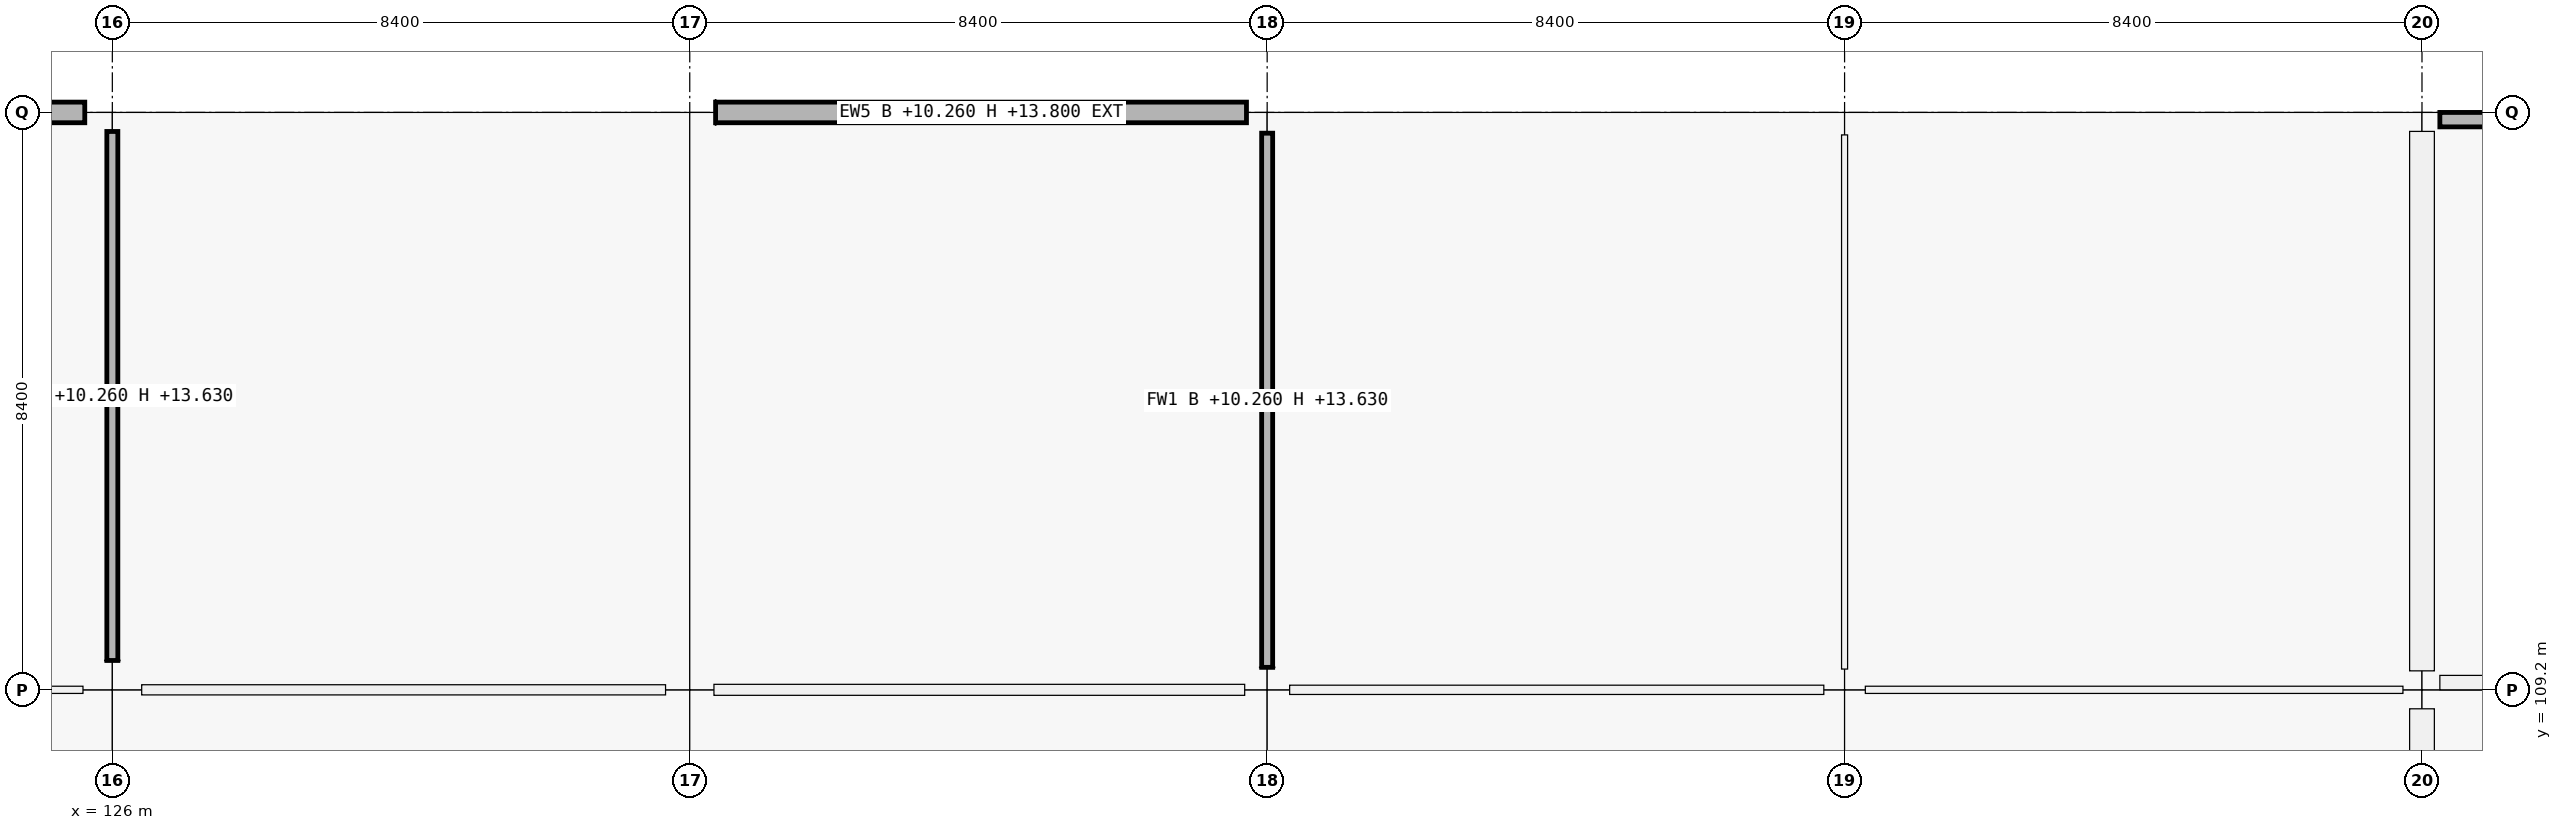
"""IFC4 building model, lengths in metres.
Left out: names, types, materials, properties, quantities, classifications, styles, units other than length and angle.
Written with IfcOpenShell. Run it as: python <this file> out.ifc"""

import sys

from ifc_helpers import new_model, si_unit, direction, frame, frame_2d, origin, origin_2d, place, context, subcontext, project, spatial, rectangle, extrude, element, fill, save


model = new_model("IFC4")
c1 = context("Model", 3, precision=1e-05, world=origin(), true_north=direction((0.0, 1.0)))
c2 = subcontext(c1, "Body", "Model", "MODEL_VIEW")
j1 = project(units=[si_unit("LENGTHUNIT", "METRE"), si_unit("PLANEANGLEUNIT", "RADIAN")], contexts=[c1])
p1 = place(None, origin())
s1 = spatial("IfcSite", under=j1, at=p1, CompositionType="ELEMENT")
p2 = place(p1, origin())
s2 = spatial("IfcBuilding", under=s1, at=p2, CompositionType="ELEMENT")
p3 = place(p2, frame((0.0, 0.0, 10.26)))
s3 = spatial("IfcBuildingStorey", under=s2, at=p3, CompositionType="ELEMENT", Elevation=10.26)
p4 = place(p3, frame((126.0, 109.2, 0.0), z_axis=(0.0, 0.0, 1.0), x_axis=(1.0, 0.0, 0.0)))
e1 = element("IfcColumn", 1, at=p4, inside=s3, PredefinedType="COLUMN", context=c2, shape_type="SweptSolid", body=[
    extrude(rectangle(XDim=0.85, YDim=0.85, at=origin_2d()), origin(), (0.0, 0.0, 1.0), 4.5),
])
p5 = place(p3, frame((126.0, 117.6, 0.0), z_axis=(0.0, 0.0, 1.0), x_axis=(1.0, 0.0, 0.0)))
e2 = element("IfcColumn", 2, at=p5, inside=s3, PredefinedType="COLUMN", context=c2, shape_type="SweptSolid", body=[
    extrude(rectangle(XDim=0.8, YDim=0.55, at=origin_2d()), origin(), (0.0, 0.0, 1.0), 4.5),
])
p6 = place(p3, frame((134.4, 109.2, 0.0), z_axis=(0.0, 0.0, 1.0), x_axis=(1.0, 0.0, 0.0)))
e3 = element("IfcColumn", 3, at=p6, inside=s3, PredefinedType="COLUMN", context=c2, shape_type="SweptSolid", body=[
    extrude(rectangle(XDim=0.7, YDim=0.7, at=origin_2d()), origin(), (0.0, 0.0, 1.0), 4.5),
])
p7 = place(p3, frame((134.4, 117.6, 0.0), z_axis=(0.0, 0.0, 1.0), x_axis=(1.0, 0.0, 0.0)))
e4 = element("IfcColumn", 4, at=p7, inside=s3, PredefinedType="COLUMN", context=c2, shape_type="SweptSolid", body=[
    extrude(rectangle(XDim=0.75, YDim=0.75, at=origin_2d()), origin(), (0.0, 0.0, 1.0), 4.5),
])
p8 = place(p3, frame((142.8, 109.2, 0.0), z_axis=(0.0, 0.0, 1.0), x_axis=(1.0, 0.0, 0.0)))
e5 = element("IfcColumn", 5, at=p8, inside=s3, PredefinedType="COLUMN", context=c2, shape_type="SweptSolid", body=[
    extrude(rectangle(XDim=0.65, YDim=0.65, at=origin_2d()), origin(), (0.0, 0.0, 1.0), 4.5),
])
for number, where, z_axis, x_axis in (
    (6, (142.8, 117.6, 0.0), (0.0, 0.0, 1.0), (1.0, 0.0, 0.0)),
    (7, (151.2, 109.2, 0.0), (0.0, 0.0, 1.0), (1.0, 0.0, 0.0)),
):
    element("IfcColumn", number, at=place(p3, frame(where, z_axis=z_axis, x_axis=x_axis)), inside=s3, PredefinedType="COLUMN", context=c2, shape_type="SweptSolid", body=[
        extrude(rectangle(XDim=0.6, YDim=0.6, at=origin_2d()), origin(), (0.0, 0.0, 1.0), 4.5),
    ])
p9 = place(p3, frame((151.2, 117.6, 0.0), z_axis=(0.0, 0.0, 1.0), x_axis=(1.0, 0.0, 0.0)))
e8 = element("IfcColumn", 8, at=p9, inside=s3, PredefinedType="COLUMN", context=c2, shape_type="SweptSolid", body=[
    extrude(rectangle(XDim=0.65, YDim=0.65, at=origin_2d()), origin(), (0.0, 0.0, 1.0), 4.5),
])
for number, where, z_axis, x_axis in (
    (9, (159.6, 109.2, 0.0), (0.0, 0.0, 1.0), (1.0, 0.0, 0.0)),
    (10, (159.6, 117.6, 0.0), (0.0, 0.0, 1.0), (1.0, 0.0, 0.0)),
):
    element("IfcColumn", number, at=place(p3, frame(where, z_axis=z_axis, x_axis=x_axis)), inside=s3, PredefinedType="COLUMN", context=c2, shape_type="SweptSolid", body=[
        extrude(rectangle(XDim=0.55, YDim=0.55, at=origin_2d()), origin(), (0.0, 0.0, 1.0), 4.25),
    ])
p10 = place(p3, frame((118.001, 117.6, 0.0), z_axis=(0.0, 0.0, 1.0), x_axis=(1.0, 0.0, 0.0)))
e11 = element("IfcWall", 11, at=p10, inside=s3, PredefinedType="SOLIDWALL", context=c2, shape_type="SweptSolid", body=[
    extrude(rectangle(XDim=7.598, YDim=0.3, at=frame_2d((3.799, 0.0))), origin(), (0.0, 0.0, 1.0), 3.54),
])
p11 = place(p10, frame((3.149, 0.0, 0.9)))
e12 = element("IfcOpeningElement", 12, at=p11, cuts=e11, PredefinedType="OPENING", context=c2, shape_type="SweptSolid", body=[
    extrude(rectangle(XDim=1.3, YDim=1.95, at=frame_2d((0.65, 0.975))), frame((0.0, 0.15, 0.0), z_axis=(0.0, -1.0, 0.0), x_axis=(1.0, 0.0, 0.0)), (0.0, 0.0, 1.0), 0.3),
])
p12 = place(p3, frame((134.776, 117.6, 0.0), z_axis=(0.0, 0.0, 1.0), x_axis=(1.0, 0.0, 0.0)))
e13 = element("IfcWall", 13, at=p12, inside=s3, PredefinedType="SOLIDWALL", context=c2, shape_type="SweptSolid", body=[
    extrude(rectangle(XDim=7.723, YDim=0.3, at=frame_2d((3.862, 0.0))), origin(), (0.0, 0.0, 1.0), 3.54),
])
p13 = place(p12, frame((3.087, 0.0, 0.9)))
e14 = element("IfcOpeningElement", 14, at=p13, cuts=e13, PredefinedType="OPENING", context=c2, shape_type="SweptSolid", body=[
    extrude(rectangle(XDim=1.55, YDim=1.6, at=frame_2d((0.775, 0.8))), frame((0.0, 0.15, 0.0), z_axis=(0.0, -1.0, 0.0), x_axis=(1.0, 0.0, 0.0)), (0.0, 0.0, 1.0), 0.3),
])
p14 = place(p3, frame((159.6, 108.924, 0.0), z_axis=(0.0, 0.0, 1.0), x_axis=(0.0, -1.0, 0.0)))
e15 = element("IfcWall", 15, at=p14, inside=s3, PredefinedType="SOLIDWALL", context=c2, shape_type="SweptSolid", body=[
    extrude(rectangle(XDim=7.848, YDim=0.36, at=frame_2d((3.924, 0.0))), origin(), (0.0, 0.0, 1.0), 3.54),
])
p15 = place(p14, frame((3.099, 0.0, 0.0)))
e16 = element("IfcOpeningElement", 16, at=p15, cuts=e15, PredefinedType="OPENING", context=c2, shape_type="SweptSolid", body=[
    extrude(rectangle(XDim=1.65, YDim=2.2, at=frame_2d((0.825, 1.1))), frame((0.0, 0.18, 0.0), z_axis=(0.0, -1.0, 0.0), x_axis=(1.0, 0.0, 0.0)), (0.0, 0.0, 1.0), 0.36),
])
p16 = place(p3, frame((159.6, 117.324, 0.0), z_axis=(0.0, 0.0, 1.0), x_axis=(0.0, -1.0, 0.0)))
e17 = element("IfcWall", 17, at=p16, inside=s3, PredefinedType="SOLIDWALL", context=c2, shape_type="SweptSolid", body=[
    extrude(rectangle(XDim=7.848, YDim=0.36, at=frame_2d((3.924, 0.0))), origin(), (0.0, 0.0, 1.0), 3.54),
])
p17 = place(p16, frame((3.174, 0.0, 0.9)))
e18 = element("IfcOpeningElement", 18, at=p17, cuts=e17, PredefinedType="OPENING", context=c2, shape_type="SweptSolid", body=[
    extrude(rectangle(XDim=1.5, YDim=1.8, at=frame_2d((0.75, 0.9))), frame((0.0, 0.18, 0.0), z_axis=(0.0, -1.0, 0.0), x_axis=(1.0, 0.0, 0.0)), (0.0, 0.0, 1.0), 0.36),
])
for number, where, z_axis, x_axis in (
    (19, (167.74, 109.305, 0.0), (0.0, 0.0, 1.0), (-1.0, 0.0, 0.0)),
    (20, (159.86, 117.495, 0.0), (0.0, 0.0, 1.0), (1.0, 0.0, 0.0)),
):
    element("IfcWall", number, at=place(p3, frame(where, z_axis=z_axis, x_axis=x_axis)), inside=s3, PredefinedType="PARAPET", context=c2, shape_type="SweptSolid", body=[
        extrude(rectangle(XDim=7.88, YDim=0.21, at=frame_2d((3.94, 0.0))), origin(), (0.0, 0.0, 1.0), 0.95),
    ])
p18 = place(p3, frame((118.027, 109.2, 0.0), z_axis=(0.0, 0.0, 1.0), x_axis=(1.0, 0.0, 0.0)))
e21 = element("IfcWall", 21, at=p18, inside=s3, PredefinedType="PARTITIONING", context=c2, shape_type="SweptSolid", body=[
    extrude(rectangle(XDim=7.546, YDim=0.105, at=frame_2d((3.773, 0.0))), origin(), (0.0, 0.0, 1.0), 3.37),
])
p19 = place(p18, frame((3.283, 0.0, 0.0)))
e22 = element("IfcOpeningElement", 22, at=p19, cuts=e21, PredefinedType="OPENING", context=c2, shape_type="SweptSolid", body=[
    extrude(rectangle(XDim=0.98, YDim=2.18, at=frame_2d((0.49, 1.09))), frame((0.0, 0.052, 0.0), z_axis=(0.0, -1.0, 0.0), x_axis=(1.0, 0.0, 0.0)), (0.0, 0.0, 1.0), 0.105),
])
p20 = place(p3, frame((126.427, 109.2, 0.0), z_axis=(0.0, 0.0, 1.0), x_axis=(1.0, 0.0, 0.0)))
e23 = element("IfcWall", 23, at=p20, inside=s3, PredefinedType="PARTITIONING", context=c2, shape_type="SweptSolid", body=[
    extrude(rectangle(XDim=7.621, YDim=0.148, at=frame_2d((3.811, 0.0))), origin(), (0.0, 0.0, 1.0), 3.37),
])
p21 = place(p20, frame((3.361, 0.0, 0.0)))
e24 = element("IfcOpeningElement", 24, at=p21, cuts=e23, PredefinedType="OPENING", context=c2, shape_type="SweptSolid", body=[
    extrude(rectangle(XDim=0.9, YDim=2.05, at=frame_2d((0.45, 1.025))), frame((0.0, 0.074, 0.0), z_axis=(0.0, -1.0, 0.0), x_axis=(1.0, 0.0, 0.0)), (0.0, 0.0, 1.0), 0.148),
])
p22 = place(p3, frame((134.752, 109.2, 0.0), z_axis=(0.0, 0.0, 1.0), x_axis=(1.0, 0.0, 0.0)))
e25 = element("IfcWall", 25, at=p22, inside=s3, PredefinedType="PARTITIONING", context=c2, shape_type="SweptSolid", body=[
    extrude(rectangle(XDim=7.721, YDim=0.16, at=frame_2d((3.86, 0.0))), origin(), (0.0, 0.0, 1.0), 3.37),
])
p23 = place(p22, frame((3.061, 0.0, 0.0)))
e26 = element("IfcOpeningElement", 26, at=p23, cuts=e25, PredefinedType="OPENING", context=c2, shape_type="SweptSolid", body=[
    extrude(rectangle(XDim=1.6, YDim=2.2, at=frame_2d((0.8, 1.1))), frame((0.0, 0.08, 0.0), z_axis=(0.0, -1.0, 0.0), x_axis=(1.0, 0.0, 0.0)), (0.0, 0.0, 1.0), 0.16),
])
p24 = place(p3, frame((143.127, 109.2, 0.0), z_axis=(0.0, 0.0, 1.0), x_axis=(1.0, 0.0, 0.0)))
e27 = element("IfcWall", 27, at=p24, inside=s3, PredefinedType="PARTITIONING", context=c2, shape_type="SweptSolid", body=[
    extrude(rectangle(XDim=7.771, YDim=0.135, at=frame_2d((3.885, 0.0))), origin(), (0.0, 0.0, 1.0), 3.37),
])
p25 = place(p24, frame((3.361, 0.0, 0.0)))
e28 = element("IfcOpeningElement", 28, at=p25, cuts=e27, PredefinedType="OPENING", context=c2, shape_type="SweptSolid", body=[
    extrude(rectangle(XDim=1.05, YDim=2.12, at=frame_2d((0.525, 1.06))), frame((0.0, 0.067, 0.0), z_axis=(0.0, -1.0, 0.0), x_axis=(1.0, 0.0, 0.0)), (0.0, 0.0, 1.0), 0.135),
])
p26 = place(p3, frame((151.502, 109.2, 0.0), z_axis=(0.0, 0.0, 1.0), x_axis=(1.0, 0.0, 0.0)))
e29 = element("IfcWall", 29, at=p26, inside=s3, PredefinedType="PARTITIONING", context=c2, shape_type="SweptSolid", body=[
    extrude(rectangle(XDim=7.821, YDim=0.105, at=frame_2d((3.911, 0.0))), origin(), (0.0, 0.0, 1.0), 3.37),
])
p27 = place(p26, frame((3.405, 0.0, 0.0)))
e30 = element("IfcOpeningElement", 30, at=p27, cuts=e29, PredefinedType="OPENING", context=c2, shape_type="SweptSolid", body=[
    extrude(rectangle(XDim=1.01, YDim=2.12, at=frame_2d((0.505, 1.06))), frame((0.0, 0.052, 0.0), z_axis=(0.0, -1.0, 0.0), x_axis=(1.0, 0.0, 0.0)), (0.0, 0.0, 1.0), 0.105),
])
p28 = place(p3, frame((126.0, 109.627, 0.0), z_axis=(0.0, 0.0, 1.0), x_axis=(0.0, 1.0, 0.0)))
e31 = element("IfcWall", 31, at=p28, inside=s3, PredefinedType="PARTITIONING", context=c2, shape_type="SweptSolid", body=[
    extrude(rectangle(XDim=7.696, YDim=0.16, at=frame_2d((3.848, 0.0))), origin(), (0.0, 0.0, 1.0), 3.37),
])
p29 = place(p28, frame((3.273, 0.0, 0.0)))
e32 = element("IfcOpeningElement", 32, at=p29, cuts=e31, PredefinedType="OPENING", context=c2, shape_type="SweptSolid", body=[
    extrude(rectangle(XDim=1.15, YDim=2.2, at=frame_2d((0.575, 1.1))), frame((0.0, 0.08, 0.0), z_axis=(0.0, -1.0, 0.0), x_axis=(1.0, 0.0, 0.0)), (0.0, 0.0, 1.0), 0.16),
])
p30 = place(p3, frame((142.8, 109.527, 0.0), z_axis=(0.0, 0.0, 1.0), x_axis=(0.0, 1.0, 0.0)))
e33 = element("IfcWall", 33, at=p30, inside=s3, PredefinedType="PARTITIONING", context=c2, shape_type="SweptSolid", body=[
    extrude(rectangle(XDim=7.771, YDim=0.16, at=frame_2d((3.885, 0.0))), origin(), (0.0, 0.0, 1.0), 3.37),
])
p31 = place(p30, frame((3.335, 0.0, 0.0)))
e34 = element("IfcOpeningElement", 34, at=p31, cuts=e33, PredefinedType="OPENING", context=c2, shape_type="SweptSolid", body=[
    extrude(rectangle(XDim=1.1, YDim=2.15, at=frame_2d((0.55, 1.075))), frame((0.0, 0.08, 0.0), z_axis=(0.0, -1.0, 0.0), x_axis=(1.0, 0.0, 0.0)), (0.0, 0.0, 1.0), 0.16),
])
p32 = place(p3, frame((151.2, 109.502, 0.0), z_axis=(0.0, 0.0, 1.0), x_axis=(0.0, 1.0, 0.0)))
e35 = element("IfcWall", 35, at=p32, inside=s3, PredefinedType="PARTITIONING", context=c2, shape_type="SweptSolid", body=[
    extrude(rectangle(XDim=7.771, YDim=0.088, at=frame_2d((3.885, 0.0))), origin(), (0.0, 0.0, 1.0), 3.37),
])
p33 = place(p32, frame((3.421, 0.0, 0.0)))
e36 = element("IfcOpeningElement", 36, at=p33, cuts=e35, PredefinedType="OPENING", context=c2, shape_type="SweptSolid", body=[
    extrude(rectangle(XDim=0.93, YDim=2.12, at=frame_2d((0.465, 1.06))), frame((0.0, 0.044, 0.0), z_axis=(0.0, -1.0, 0.0), x_axis=(1.0, 0.0, 0.0)), (0.0, 0.0, 1.0), 0.088),
])
p34 = place(p13, origin())
e37 = element("IfcWindow", 37, at=p34, inside=s3, PartitioningType="SINGLE_PANEL", PredefinedType="WINDOW", context=c2, shape_type="SweptSolid", body=[
    extrude(rectangle(XDim=1.55, YDim=1.6, at=frame_2d((0.775, 0.8))), frame((0.0, 0.03, 0.0), z_axis=(0.0, -1.0, 0.0), x_axis=(1.0, 0.0, 0.0)), (0.0, 0.0, 1.0), 0.06),
])
fill(e14, e37)
p35 = place(p17, origin())
e38 = element("IfcWindow", 38, at=p35, inside=s3, PartitioningType="SINGLE_PANEL", PredefinedType="WINDOW", context=c2, shape_type="SweptSolid", body=[
    extrude(rectangle(XDim=1.5, YDim=1.8, at=frame_2d((0.75, 0.9))), frame((0.0, 0.03, 0.0), z_axis=(0.0, -1.0, 0.0), x_axis=(1.0, 0.0, 0.0)), (0.0, 0.0, 1.0), 0.06),
])
fill(e18, e38)
p36 = place(p21, origin())
e39 = element("IfcDoor", 39, at=p36, inside=s3, OperationType="SINGLE_SWING_RIGHT", PredefinedType="DOOR", context=c2, shape_type="SweptSolid", body=[
    extrude(rectangle(XDim=0.9, YDim=2.05, at=frame_2d((0.45, 1.025))), frame((0.0, 0.025, 0.0), z_axis=(0.0, -1.0, 0.0), x_axis=(1.0, 0.0, 0.0)), (0.0, 0.0, 1.0), 0.05),
])
fill(e24, e39)
p37 = place(p23, origin())
e40 = element("IfcDoor", 40, at=p37, inside=s3, OperationType="DOUBLE_DOOR_SINGLE_SWING", PredefinedType="DOOR", context=c2, shape_type="SweptSolid", body=[
    extrude(rectangle(XDim=1.6, YDim=2.2, at=frame_2d((0.8, 1.1))), frame((0.0, 0.025, 0.0), z_axis=(0.0, -1.0, 0.0), x_axis=(1.0, 0.0, 0.0)), (0.0, 0.0, 1.0), 0.05),
])
fill(e26, e40)
p38 = place(p25, origin())
e41 = element("IfcDoor", 41, at=p38, inside=s3, OperationType="SINGLE_SWING_RIGHT", PredefinedType="DOOR", context=c2, shape_type="SweptSolid", body=[
    extrude(rectangle(XDim=1.05, YDim=2.12, at=frame_2d((0.525, 1.06))), frame((0.0, 0.025, 0.0), z_axis=(0.0, -1.0, 0.0), x_axis=(1.0, 0.0, 0.0)), (0.0, 0.0, 1.0), 0.05),
])
fill(e28, e41)
p39 = place(p27, origin())
e42 = element("IfcDoor", 42, at=p39, inside=s3, OperationType="SINGLE_SWING_LEFT", PredefinedType="DOOR", context=c2, shape_type="SweptSolid", body=[
    extrude(rectangle(XDim=1.01, YDim=2.12, at=frame_2d((0.505, 1.06))), frame((0.0, 0.025, 0.0), z_axis=(0.0, -1.0, 0.0), x_axis=(1.0, 0.0, 0.0)), (0.0, 0.0, 1.0), 0.05),
])
fill(e30, e42)
p40 = place(p29, origin())
e43 = element("IfcDoor", 43, at=p40, inside=s3, OperationType="SINGLE_SWING_RIGHT", PredefinedType="DOOR", context=c2, shape_type="SweptSolid", body=[
    extrude(rectangle(XDim=1.15, YDim=2.2, at=frame_2d((0.575, 1.1))), frame((0.0, 0.025, 0.0), z_axis=(0.0, -1.0, 0.0), x_axis=(1.0, 0.0, 0.0)), (0.0, 0.0, 1.0), 0.05),
])
fill(e32, e43)
p41 = place(p31, origin())
e44 = element("IfcDoor", 44, at=p41, inside=s3, OperationType="SINGLE_SWING_LEFT", PredefinedType="DOOR", context=c2, shape_type="SweptSolid", body=[
    extrude(rectangle(XDim=1.1, YDim=2.15, at=frame_2d((0.55, 1.075))), frame((0.0, 0.025, 0.0), z_axis=(0.0, -1.0, 0.0), x_axis=(1.0, 0.0, 0.0)), (0.0, 0.0, 1.0), 0.05),
])
fill(e34, e44)
p42 = place(p33, origin())
e45 = element("IfcDoor", 45, at=p42, inside=s3, OperationType="SINGLE_SWING_RIGHT", PredefinedType="DOOR", context=c2, shape_type="SweptSolid", body=[
    extrude(rectangle(XDim=0.93, YDim=2.12, at=frame_2d((0.465, 1.06))), frame((0.0, 0.025, 0.0), z_axis=(0.0, -1.0, 0.0), x_axis=(1.0, 0.0, 0.0)), (0.0, 0.0, 1.0), 0.05),
])
fill(e36, e45)
save(model, sys.argv[1])
